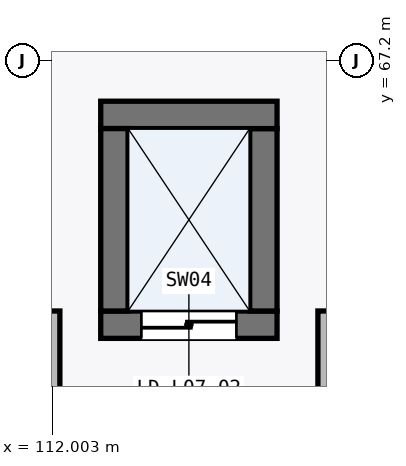
"""IFC4 building model, lengths in metres.
Left out: names, types, materials, properties, quantities, classifications, styles, units other than length and angle.
Written with IfcOpenShell. Run it as: python <this file> out.ifc"""

import sys

from ifc_helpers import new_model, si_unit, direction, frame, frame_2d, origin, place, context, subcontext, project, spatial, rectangle, extrude, element, fill, save


model = new_model("IFC4")
c1 = context("Model", 3, precision=1e-05, world=origin(), true_north=direction((0.0, 1.0)))
c2 = subcontext(c1, "Body", "Model", "MODEL_VIEW")
j1 = project(units=[si_unit("LENGTHUNIT", "METRE"), si_unit("PLANEANGLEUNIT", "RADIAN")], contexts=[c1])
p1 = place(None, origin())
s1 = spatial("IfcSite", under=j1, at=p1, CompositionType="ELEMENT")
p2 = place(p1, origin())
s2 = spatial("IfcBuilding", under=s1, at=p2, CompositionType="ELEMENT")
p3 = place(p2, frame((0.0, 0.0, 31.8)))
s3 = spatial("IfcBuildingStorey", under=s2, at=p3, CompositionType="ELEMENT", Elevation=31.8)
p4 = place(p3, frame((112.64, 63.72, 0.0), z_axis=(0.0, 0.0, 1.0), x_axis=(1.0, 0.0, 0.0)))
e1 = element("IfcWall", 1, at=p4, inside=s3, PredefinedType="SHEAR", context=c2, shape_type="SweptSolid", body=[
    extrude(rectangle(XDim=2.32, YDim=0.36, at=frame_2d((1.16, 0.0))), origin(), (0.0, 0.0, 1.0), 4.245),
])
p5 = place(p4, frame((0.535, 0.0, 0.0)))
e2 = element("IfcOpeningElement", 2, at=p5, cuts=e1, PredefinedType="OPENING", context=c2, shape_type="SweptSolid", body=[
    extrude(rectangle(XDim=1.25, YDim=2.2, at=frame_2d((0.625, 1.1))), frame((0.0, 0.19, 0.0), z_axis=(0.0, -1.0, 0.0), x_axis=(1.0, 0.0, 0.0)), (0.0, 0.0, 1.0), 0.38),
])
p6 = place(p3, frame((114.78, 63.9, 0.0), z_axis=(0.0, 0.0, 1.0), x_axis=(0.0, 1.0, 0.0)))
e3 = element("IfcWall", 3, at=p6, inside=s3, PredefinedType="SHEAR", context=c2, shape_type="SweptSolid", body=[
    extrude(rectangle(XDim=2.4, YDim=0.36, at=frame_2d((1.2, 0.0))), origin(), (0.0, 0.0, 1.0), 4.245),
])
p7 = place(p3, frame((114.96, 66.48, 0.0), z_axis=(0.0, 0.0, 1.0), x_axis=(-1.0, 0.0, 0.0)))
e4 = element("IfcWall", 4, at=p7, inside=s3, PredefinedType="SHEAR", context=c2, shape_type="SweptSolid", body=[
    extrude(rectangle(XDim=2.32, YDim=0.36, at=frame_2d((1.16, 0.0))), origin(), (0.0, 0.0, 1.0), 4.245),
])
p8 = place(p3, frame((112.82, 66.3, 0.0), z_axis=(0.0, 0.0, 1.0), x_axis=(0.0, -1.0, 0.0)))
e5 = element("IfcWall", 5, at=p8, inside=s3, PredefinedType="SHEAR", context=c2, shape_type="SweptSolid", body=[
    extrude(rectangle(XDim=2.4, YDim=0.36, at=frame_2d((1.2, 0.0))), origin(), (0.0, 0.0, 1.0), 4.245),
])
for number, where, z_axis, x_axis in (
    (6, (115.6, 59.397, 0.0), (0.0, 0.0, 1.0), (0.0, 1.0, 0.0)),
    (7, (112.0, 63.9, 0.0), (0.0, 0.0, 1.0), (0.0, -1.0, 0.0)),
):
    element("IfcWall", number, at=place(p3, frame(where, z_axis=z_axis, x_axis=x_axis)), inside=s3, PredefinedType="PARTITIONING", context=c2, shape_type="SweptSolid", body=[
        extrude(rectangle(XDim=4.502, YDim=0.205, at=frame_2d((2.251, 0.0))), origin(), (0.0, 0.0, 1.0), 4.245),
    ])
p9 = place(p5, frame((1.25, 0.0, 0.0), z_axis=(0.0, 0.0, 1.0), x_axis=(-1.0, 0.0, 0.0)))
e8 = element("IfcDoor", 8, at=p9, inside=s3, OperationType="DOUBLE_DOOR_SLIDING", PredefinedType="DOOR", context=c2, shape_type="SweptSolid", body=[
    extrude(rectangle(XDim=1.25, YDim=2.2, at=frame_2d((0.625, 1.1))), frame((0.0, 0.025, 0.0), z_axis=(0.0, -1.0, 0.0), x_axis=(1.0, 0.0, 0.0)), (0.0, 0.0, 1.0), 0.05),
])
fill(e2, e8)
save(model, sys.argv[1])
